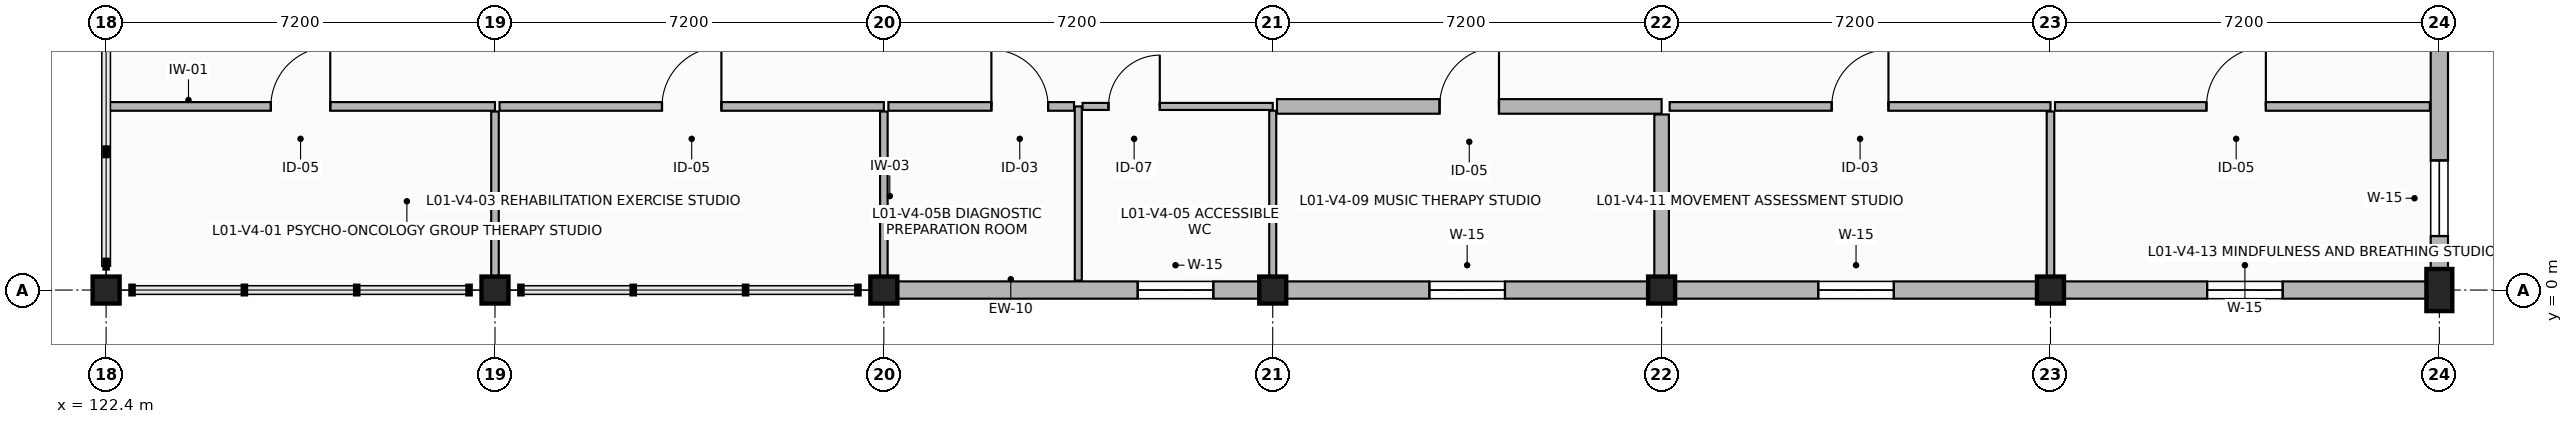
"""IFC4 building model, lengths in metres.
Left out: names, types, materials, properties, quantities, classifications, styles, units other than length and angle.
Written with IfcOpenShell. Run it as: python <this file> out.ifc"""

import sys

from ifc_helpers import new_model, si_unit, direction, frame, frame_2d, origin, origin_2d, place, context, subcontext, project, spatial, rectangle, extrude, element, fill, save


model = new_model("IFC4")
c1 = context("Model", 3, precision=1e-05, world=origin(), true_north=direction((0.0, 1.0)))
c2 = subcontext(c1, "Body", "Model", "MODEL_VIEW")
j1 = project(units=[si_unit("LENGTHUNIT", "METRE"), si_unit("PLANEANGLEUNIT", "RADIAN")], contexts=[c1])
p1 = place(None, origin())
s1 = spatial("IfcSite", under=j1, at=p1, CompositionType="ELEMENT")
p2 = place(p1, origin())
s2 = spatial("IfcBuilding", under=s1, at=p2, CompositionType="ELEMENT")
p3 = place(p2, frame((0.0, 0.0, 4.5)))
s3 = spatial("IfcBuildingStorey", under=s2, at=p3, CompositionType="ELEMENT", Elevation=4.5)
for number, where, z_axis, x_axis in (
    (1, (122.4, 0.0, 0.0), (0.0, 0.0, 1.0), (1.0, 0.0, 0.0)),
    (2, (129.6, 0.0, 0.0), (0.0, 0.0, 1.0), (1.0, 0.0, 0.0)),
    (3, (136.8, 0.0, 0.0), (0.0, 0.0, 1.0), (1.0, 0.0, 0.0)),
    (4, (144.0, 0.0, 0.0), (0.0, 0.0, 1.0), (1.0, 0.0, 0.0)),
    (5, (151.2, 0.0, 0.0), (0.0, 0.0, 1.0), (1.0, 0.0, 0.0)),
    (6, (158.4, 0.0, 0.0), (0.0, 0.0, 1.0), (1.0, 0.0, 0.0)),
):
    element("IfcColumn", number, at=place(p3, frame(where, z_axis=z_axis, x_axis=x_axis)), inside=s3, PredefinedType="COLUMN", context=c2, shape_type="SweptSolid", body=[
        extrude(rectangle(XDim=0.5, YDim=0.5, at=origin_2d()), origin(), (0.0, 0.0, 1.0), 3.9),
    ])
p4 = place(p3, frame((165.6, 0.0, 0.0), z_axis=(0.0, 0.0, 1.0), x_axis=(1.0, 0.0, 0.0)))
e7 = element("IfcColumn", 7, at=p4, inside=s3, PredefinedType="PILASTER", context=c2, shape_type="SweptSolid", body=[
    extrude(rectangle(XDim=0.48, YDim=0.78, at=origin_2d()), origin(), (0.0, 0.0, 1.0), 3.9),
])
p5 = place(p3, frame((136.8, 0.0, 0.0), z_axis=(0.0, 0.0, 1.0), x_axis=(1.0, 0.0, 0.0)))
e8 = element("IfcWall", 8, at=p5, inside=s3, PredefinedType="SOLIDWALL", context=c2, shape_type="SweptSolid", body=[
    extrude(rectangle(XDim=7.2, YDim=0.32, at=frame_2d((3.6, 0.0))), origin(), (0.0, 0.0, 1.0), 3.3),
])
p6 = place(p5, frame((4.7, 0.0, 0.85)))
e9 = element("IfcOpeningElement", 9, at=p6, cuts=e8, PredefinedType="OPENING", context=c2, shape_type="SweptSolid", body=[
    extrude(rectangle(XDim=1.4, YDim=2.2, at=frame_2d((0.7, 1.1))), frame((0.0, 0.17, 0.0), z_axis=(0.0, -1.0, 0.0), x_axis=(1.0, 0.0, 0.0)), (0.0, 0.0, 1.0), 0.34),
])
p7 = place(p3, frame((144.0, 0.0, 0.0), z_axis=(0.0, 0.0, 1.0), x_axis=(1.0, 0.0, 0.0)))
e10 = element("IfcWall", 10, at=p7, inside=s3, PredefinedType="SOLIDWALL", context=c2, shape_type="SweptSolid", body=[
    extrude(rectangle(XDim=7.2, YDim=0.32, at=frame_2d((3.6, 0.0))), origin(), (0.0, 0.0, 1.0), 3.3),
])
p8 = place(p7, frame((2.9, 0.0, 0.85)))
e11 = element("IfcOpeningElement", 11, at=p8, cuts=e10, PredefinedType="OPENING", context=c2, shape_type="SweptSolid", body=[
    extrude(rectangle(XDim=1.4, YDim=2.2, at=frame_2d((0.7, 1.1))), frame((0.0, 0.17, 0.0), z_axis=(0.0, -1.0, 0.0), x_axis=(1.0, 0.0, 0.0)), (0.0, 0.0, 1.0), 0.34),
])
p9 = place(p3, frame((151.2, 0.0, 0.0), z_axis=(0.0, 0.0, 1.0), x_axis=(1.0, 0.0, 0.0)))
e12 = element("IfcWall", 12, at=p9, inside=s3, PredefinedType="SOLIDWALL", context=c2, shape_type="SweptSolid", body=[
    extrude(rectangle(XDim=7.2, YDim=0.32, at=frame_2d((3.6, 0.0))), origin(), (0.0, 0.0, 1.0), 3.3),
])
p10 = place(p9, frame((2.9, 0.0, 0.85)))
e13 = element("IfcOpeningElement", 13, at=p10, cuts=e12, PredefinedType="OPENING", context=c2, shape_type="SweptSolid", body=[
    extrude(rectangle(XDim=1.4, YDim=2.2, at=frame_2d((0.7, 1.1))), frame((0.0, 0.17, 0.0), z_axis=(0.0, -1.0, 0.0), x_axis=(1.0, 0.0, 0.0)), (0.0, 0.0, 1.0), 0.34),
])
p11 = place(p3, frame((158.4, 0.0, 0.0), z_axis=(0.0, 0.0, 1.0), x_axis=(1.0, 0.0, 0.0)))
e14 = element("IfcWall", 14, at=p11, inside=s3, PredefinedType="SOLIDWALL", context=c2, shape_type="SweptSolid", body=[
    extrude(rectangle(XDim=7.2, YDim=0.32, at=frame_2d((3.6, 0.0))), origin(), (0.0, 0.0, 1.0), 3.3),
])
p12 = place(p11, frame((2.9, 0.0, 0.85)))
e15 = element("IfcOpeningElement", 15, at=p12, cuts=e14, PredefinedType="OPENING", context=c2, shape_type="SweptSolid", body=[
    extrude(rectangle(XDim=1.4, YDim=2.2, at=frame_2d((0.7, 1.1))), frame((0.0, 0.17, 0.0), z_axis=(0.0, -1.0, 0.0), x_axis=(1.0, 0.0, 0.0)), (0.0, 0.0, 1.0), 0.34),
])
p13 = place(p3, frame((165.6, 0.0, 0.0), z_axis=(0.0, 0.0, 1.0), x_axis=(0.0, 1.0, 0.0)))
e16 = element("IfcWall", 16, at=p13, inside=s3, PredefinedType="SOLIDWALL", context=c2, shape_type="SweptSolid", body=[
    extrude(rectangle(XDim=7.2, YDim=0.32, at=frame_2d((3.6, 0.0))), origin(), (0.0, 0.0, 1.0), 3.3),
])
p14 = place(p13, frame((1.0, 0.0, 0.85)))
e17 = element("IfcOpeningElement", 17, at=p14, cuts=e16, PredefinedType="OPENING", context=c2, shape_type="SweptSolid", body=[
    extrude(rectangle(XDim=1.4, YDim=2.2, at=frame_2d((0.7, 1.1))), frame((0.0, 0.17, 0.0), z_axis=(0.0, -1.0, 0.0), x_axis=(1.0, 0.0, 0.0)), (0.0, 0.0, 1.0), 0.34),
])
p15 = place(p3, frame((122.4, 3.4, 0.0), z_axis=(0.0, 0.0, 1.0), x_axis=(1.0, 0.0, 0.0)))
e18 = element("IfcWall", 18, at=p15, inside=s3, PredefinedType="PARTITIONING", context=c2, shape_type="SweptSolid", body=[
    extrude(rectangle(XDim=7.2, YDim=0.16, at=frame_2d((3.6, 0.0))), origin(), (0.0, 0.0, 1.0), 3.03),
])
p16 = place(p15, frame((3.05, 0.0, 0.0)))
e19 = element("IfcOpeningElement", 19, at=p16, cuts=e18, PredefinedType="OPENING", context=c2, shape_type="SweptSolid", body=[
    extrude(rectangle(XDim=1.1, YDim=2.2, at=frame_2d((0.55, 1.1))), frame((0.0, 0.09, 0.0), z_axis=(0.0, -1.0, 0.0), x_axis=(1.0, 0.0, 0.0)), (0.0, 0.0, 1.0), 0.18),
])
p17 = place(p3, frame((129.6, 3.306, 0.0), z_axis=(0.0, 0.0, 1.0), x_axis=(0.0, -1.0, 0.0)))
e20 = element("IfcWall", 20, at=p17, inside=s3, PredefinedType="PARTITIONING", context=c2, shape_type="SweptSolid", body=[
    extrude(rectangle(XDim=3.306, YDim=0.14, at=frame_2d((1.653, 0.0))), origin(), (0.0, 0.0, 1.0), 3.03),
])
p18 = place(p3, frame((129.684, 3.4, 0.0), z_axis=(0.0, 0.0, 1.0), x_axis=(1.0, 0.0, 0.0)))
e21 = element("IfcWall", 21, at=p18, inside=s3, PredefinedType="PARTITIONING", context=c2, shape_type="SweptSolid", body=[
    extrude(rectangle(XDim=7.116, YDim=0.16, at=frame_2d((3.558, 0.0))), origin(), (0.0, 0.0, 1.0), 3.03),
])
p19 = place(p18, frame((3.008, 0.0, 0.0)))
e22 = element("IfcOpeningElement", 22, at=p19, cuts=e21, PredefinedType="OPENING", context=c2, shape_type="SweptSolid", body=[
    extrude(rectangle(XDim=1.1, YDim=2.2, at=frame_2d((0.55, 1.1))), frame((0.0, 0.09, 0.0), z_axis=(0.0, -1.0, 0.0), x_axis=(1.0, 0.0, 0.0)), (0.0, 0.0, 1.0), 0.18),
])
p20 = place(p3, frame((136.8, 3.306, 0.0), z_axis=(0.0, 0.0, 1.0), x_axis=(0.0, -1.0, 0.0)))
e23 = element("IfcWall", 23, at=p20, inside=s3, PredefinedType="PARTITIONING", context=c2, shape_type="SweptSolid", body=[
    extrude(rectangle(XDim=3.131, YDim=0.14, at=frame_2d((1.565, 0.0))), origin(), (0.0, 0.0, 1.0), 3.03),
])
p21 = place(p3, frame((140.4, 0.175, 0.0), z_axis=(0.0, 0.0, 1.0), x_axis=(0.0, 1.0, 0.0)))
e24 = element("IfcWall", 24, at=p21, inside=s3, PredefinedType="PARTITIONING", context=c2, shape_type="SweptSolid", body=[
    extrude(rectangle(XDim=3.225, YDim=0.13, at=frame_2d((1.612, 0.0))), origin(), (0.0, 0.0, 1.0), 3.03),
])
p22 = place(p3, frame((140.479, 3.4, 0.0), z_axis=(0.0, 0.0, 1.0), x_axis=(1.0, 0.0, 0.0)))
e25 = element("IfcWall", 25, at=p22, inside=s3, PredefinedType="PARTITIONING", context=c2, shape_type="SweptSolid", body=[
    extrude(rectangle(XDim=3.521, YDim=0.13, at=frame_2d((1.76, 0.0))), origin(), (0.0, 0.0, 1.0), 3.03),
])
p23 = place(p22, frame((0.48, 0.0, 0.0)))
e26 = element("IfcOpeningElement", 26, at=p23, cuts=e25, PredefinedType="OPENING", context=c2, shape_type="SweptSolid", body=[
    extrude(rectangle(XDim=0.95, YDim=2.1, at=frame_2d((0.475, 1.05))), frame((0.0, 0.075, 0.0), z_axis=(0.0, -1.0, 0.0), x_axis=(1.0, 0.0, 0.0)), (0.0, 0.0, 1.0), 0.15),
])
p24 = place(p3, frame((144.0, 3.321, 0.0), z_axis=(0.0, 0.0, 1.0), x_axis=(0.0, -1.0, 0.0)))
e27 = element("IfcWall", 27, at=p24, inside=s3, PredefinedType="PARTITIONING", context=c2, shape_type="SweptSolid", body=[
    extrude(rectangle(XDim=3.146, YDim=0.13, at=frame_2d((1.573, 0.0))), origin(), (0.0, 0.0, 1.0), 3.03),
])
p25 = place(p3, frame((136.884, 3.4, 0.0), z_axis=(0.0, 0.0, 1.0), x_axis=(1.0, 0.0, 0.0)))
e28 = element("IfcWall", 28, at=p25, inside=s3, PredefinedType="PARTITIONING", context=c2, shape_type="SweptSolid", body=[
    extrude(rectangle(XDim=3.437, YDim=0.16, at=frame_2d((1.719, 0.0))), origin(), (0.0, 0.0, 1.0), 3.03),
])
p26 = place(p25, frame((1.907, 0.0, 0.0)))
e29 = element("IfcOpeningElement", 29, at=p26, cuts=e28, PredefinedType="OPENING", context=c2, shape_type="SweptSolid", body=[
    extrude(rectangle(XDim=1.05, YDim=2.15, at=frame_2d((0.525, 1.075))), frame((0.0, 0.09, 0.0), z_axis=(0.0, -1.0, 0.0), x_axis=(1.0, 0.0, 0.0)), (0.0, 0.0, 1.0), 0.18),
])
p27 = place(p3, frame((144.079, 3.4, 0.0), z_axis=(0.0, 0.0, 1.0), x_axis=(1.0, 0.0, 0.0)))
e30 = element("IfcWall", 30, at=p27, inside=s3, PredefinedType="PARTITIONING", context=c2, shape_type="SweptSolid", body=[
    extrude(rectangle(XDim=7.121, YDim=0.27, at=frame_2d((3.561, 0.0))), origin(), (0.0, 0.0, 1.0), 3.03),
])
p28 = place(p27, frame((3.01, 0.0, 0.0)))
e31 = element("IfcOpeningElement", 31, at=p28, cuts=e30, PredefinedType="OPENING", context=c2, shape_type="SweptSolid", body=[
    extrude(rectangle(XDim=1.1, YDim=2.2, at=frame_2d((0.55, 1.1))), frame((0.0, 0.145, 0.0), z_axis=(0.0, -1.0, 0.0), x_axis=(1.0, 0.0, 0.0)), (0.0, 0.0, 1.0), 0.29),
])
p29 = place(p3, frame((151.2, 3.251, 0.0), z_axis=(0.0, 0.0, 1.0), x_axis=(0.0, -1.0, 0.0)))
e32 = element("IfcWall", 32, at=p29, inside=s3, PredefinedType="PARTITIONING", context=c2, shape_type="SweptSolid", body=[
    extrude(rectangle(XDim=3.076, YDim=0.27, at=frame_2d((1.538, 0.0))), origin(), (0.0, 0.0, 1.0), 3.03),
])
p30 = place(p3, frame((151.349, 3.4, 0.0), z_axis=(0.0, 0.0, 1.0), x_axis=(1.0, 0.0, 0.0)))
e33 = element("IfcWall", 33, at=p30, inside=s3, PredefinedType="PARTITIONING", context=c2, shape_type="SweptSolid", body=[
    extrude(rectangle(XDim=7.051, YDim=0.16, at=frame_2d((3.525, 0.0))), origin(), (0.0, 0.0, 1.0), 3.03),
])
p31 = place(p30, frame((3.001, 0.0, 0.0)))
e34 = element("IfcOpeningElement", 34, at=p31, cuts=e33, PredefinedType="OPENING", context=c2, shape_type="SweptSolid", body=[
    extrude(rectangle(XDim=1.05, YDim=2.15, at=frame_2d((0.525, 1.075))), frame((0.0, 0.09, 0.0), z_axis=(0.0, -1.0, 0.0), x_axis=(1.0, 0.0, 0.0)), (0.0, 0.0, 1.0), 0.18),
])
p32 = place(p3, frame((158.4, 3.306, 0.0), z_axis=(0.0, 0.0, 1.0), x_axis=(0.0, -1.0, 0.0)))
e35 = element("IfcWall", 35, at=p32, inside=s3, PredefinedType="PARTITIONING", context=c2, shape_type="SweptSolid", body=[
    extrude(rectangle(XDim=3.131, YDim=0.14, at=frame_2d((1.565, 0.0))), origin(), (0.0, 0.0, 1.0), 3.03),
])
p33 = place(p3, frame((158.484, 3.4, 0.0), z_axis=(0.0, 0.0, 1.0), x_axis=(1.0, 0.0, 0.0)))
e36 = element("IfcWall", 36, at=p33, inside=s3, PredefinedType="PARTITIONING", context=c2, shape_type="SweptSolid", body=[
    extrude(rectangle(XDim=6.941, YDim=0.16, at=frame_2d((3.471, 0.0))), origin(), (0.0, 0.0, 1.0), 3.03),
])
p34 = place(p33, frame((2.804, 0.0, 0.0)))
e37 = element("IfcOpeningElement", 37, at=p34, cuts=e36, PredefinedType="OPENING", context=c2, shape_type="SweptSolid", body=[
    extrude(rectangle(XDim=1.1, YDim=2.2, at=frame_2d((0.55, 1.1))), frame((0.0, 0.09, 0.0), z_axis=(0.0, -1.0, 0.0), x_axis=(1.0, 0.0, 0.0)), (0.0, 0.0, 1.0), 0.18),
])
p35 = place(p6, origin())
e38 = element("IfcWindow", 38, at=p35, inside=s3, PartitioningType="SINGLE_PANEL", PredefinedType="WINDOW", context=c2, shape_type="SweptSolid", body=[
    extrude(rectangle(XDim=1.4, YDim=2.2, at=frame_2d((0.7, 1.1))), frame((0.0, 0.03, 0.0), z_axis=(0.0, -1.0, 0.0), x_axis=(1.0, 0.0, 0.0)), (0.0, 0.0, 1.0), 0.06),
])
fill(e9, e38)
p36 = place(p8, origin())
e39 = element("IfcWindow", 39, at=p36, inside=s3, PartitioningType="SINGLE_PANEL", PredefinedType="WINDOW", context=c2, shape_type="SweptSolid", body=[
    extrude(rectangle(XDim=1.4, YDim=2.2, at=frame_2d((0.7, 1.1))), frame((0.0, 0.03, 0.0), z_axis=(0.0, -1.0, 0.0), x_axis=(1.0, 0.0, 0.0)), (0.0, 0.0, 1.0), 0.06),
])
fill(e11, e39)
p37 = place(p10, origin())
e40 = element("IfcWindow", 40, at=p37, inside=s3, PartitioningType="SINGLE_PANEL", PredefinedType="WINDOW", context=c2, shape_type="SweptSolid", body=[
    extrude(rectangle(XDim=1.4, YDim=2.2, at=frame_2d((0.7, 1.1))), frame((0.0, 0.03, 0.0), z_axis=(0.0, -1.0, 0.0), x_axis=(1.0, 0.0, 0.0)), (0.0, 0.0, 1.0), 0.06),
])
fill(e13, e40)
p38 = place(p12, origin())
e41 = element("IfcWindow", 41, at=p38, inside=s3, PartitioningType="SINGLE_PANEL", PredefinedType="WINDOW", context=c2, shape_type="SweptSolid", body=[
    extrude(rectangle(XDim=1.4, YDim=2.2, at=frame_2d((0.7, 1.1))), frame((0.0, 0.03, 0.0), z_axis=(0.0, -1.0, 0.0), x_axis=(1.0, 0.0, 0.0)), (0.0, 0.0, 1.0), 0.06),
])
fill(e15, e41)
p39 = place(p14, origin())
e42 = element("IfcWindow", 42, at=p39, inside=s3, PartitioningType="SINGLE_PANEL", PredefinedType="WINDOW", context=c2, shape_type="SweptSolid", body=[
    extrude(rectangle(XDim=1.4, YDim=2.2, at=frame_2d((0.7, 1.1))), frame((0.0, 0.03, 0.0), z_axis=(0.0, -1.0, 0.0), x_axis=(1.0, 0.0, 0.0)), (0.0, 0.0, 1.0), 0.06),
])
fill(e17, e42)
p40 = place(p16, origin())
e43 = element("IfcDoor", 43, at=p40, inside=s3, OperationType="SINGLE_SWING_RIGHT", PredefinedType="DOOR", context=c2, shape_type="SweptSolid", body=[
    extrude(rectangle(XDim=1.1, YDim=2.2, at=frame_2d((0.55, 1.1))), frame((0.0, 0.025, 0.0), z_axis=(0.0, -1.0, 0.0), x_axis=(1.0, 0.0, 0.0)), (0.0, 0.0, 1.0), 0.05),
])
fill(e19, e43)
p41 = place(p19, origin())
e44 = element("IfcDoor", 44, at=p41, inside=s3, OperationType="SINGLE_SWING_RIGHT", PredefinedType="DOOR", context=c2, shape_type="SweptSolid", body=[
    extrude(rectangle(XDim=1.1, YDim=2.2, at=frame_2d((0.55, 1.1))), frame((0.0, 0.025, 0.0), z_axis=(0.0, -1.0, 0.0), x_axis=(1.0, 0.0, 0.0)), (0.0, 0.0, 1.0), 0.05),
])
fill(e22, e44)
p42 = place(p23, origin())
e45 = element("IfcDoor", 45, at=p42, inside=s3, OperationType="SINGLE_SWING_RIGHT", PredefinedType="DOOR", context=c2, shape_type="SweptSolid", body=[
    extrude(rectangle(XDim=0.95, YDim=2.1, at=frame_2d((0.475, 1.05))), frame((0.0, 0.025, 0.0), z_axis=(0.0, -1.0, 0.0), x_axis=(1.0, 0.0, 0.0)), (0.0, 0.0, 1.0), 0.05),
])
fill(e26, e45)
p43 = place(p26, origin())
e46 = element("IfcDoor", 46, at=p43, inside=s3, OperationType="SINGLE_SWING_LEFT", PredefinedType="DOOR", context=c2, shape_type="SweptSolid", body=[
    extrude(rectangle(XDim=1.05, YDim=2.15, at=frame_2d((0.525, 1.075))), frame((0.0, 0.025, 0.0), z_axis=(0.0, -1.0, 0.0), x_axis=(1.0, 0.0, 0.0)), (0.0, 0.0, 1.0), 0.05),
])
fill(e29, e46)
p44 = place(p28, origin())
e47 = element("IfcDoor", 47, at=p44, inside=s3, OperationType="SINGLE_SWING_RIGHT", PredefinedType="DOOR", context=c2, shape_type="SweptSolid", body=[
    extrude(rectangle(XDim=1.1, YDim=2.2, at=frame_2d((0.55, 1.1))), frame((0.0, 0.025, 0.0), z_axis=(0.0, -1.0, 0.0), x_axis=(1.0, 0.0, 0.0)), (0.0, 0.0, 1.0), 0.05),
])
fill(e31, e47)
p45 = place(p31, origin())
e48 = element("IfcDoor", 48, at=p45, inside=s3, OperationType="SINGLE_SWING_RIGHT", PredefinedType="DOOR", context=c2, shape_type="SweptSolid", body=[
    extrude(rectangle(XDim=1.05, YDim=2.15, at=frame_2d((0.525, 1.075))), frame((0.0, 0.025, 0.0), z_axis=(0.0, -1.0, 0.0), x_axis=(1.0, 0.0, 0.0)), (0.0, 0.0, 1.0), 0.05),
])
fill(e34, e48)
p46 = place(p34, origin())
e49 = element("IfcDoor", 49, at=p46, inside=s3, OperationType="SINGLE_SWING_RIGHT", PredefinedType="DOOR", context=c2, shape_type="SweptSolid", body=[
    extrude(rectangle(XDim=1.1, YDim=2.2, at=frame_2d((0.55, 1.1))), frame((0.0, 0.025, 0.0), z_axis=(0.0, -1.0, 0.0), x_axis=(1.0, 0.0, 0.0)), (0.0, 0.0, 1.0), 0.05),
])
fill(e37, e49)
save(model, sys.argv[1])
